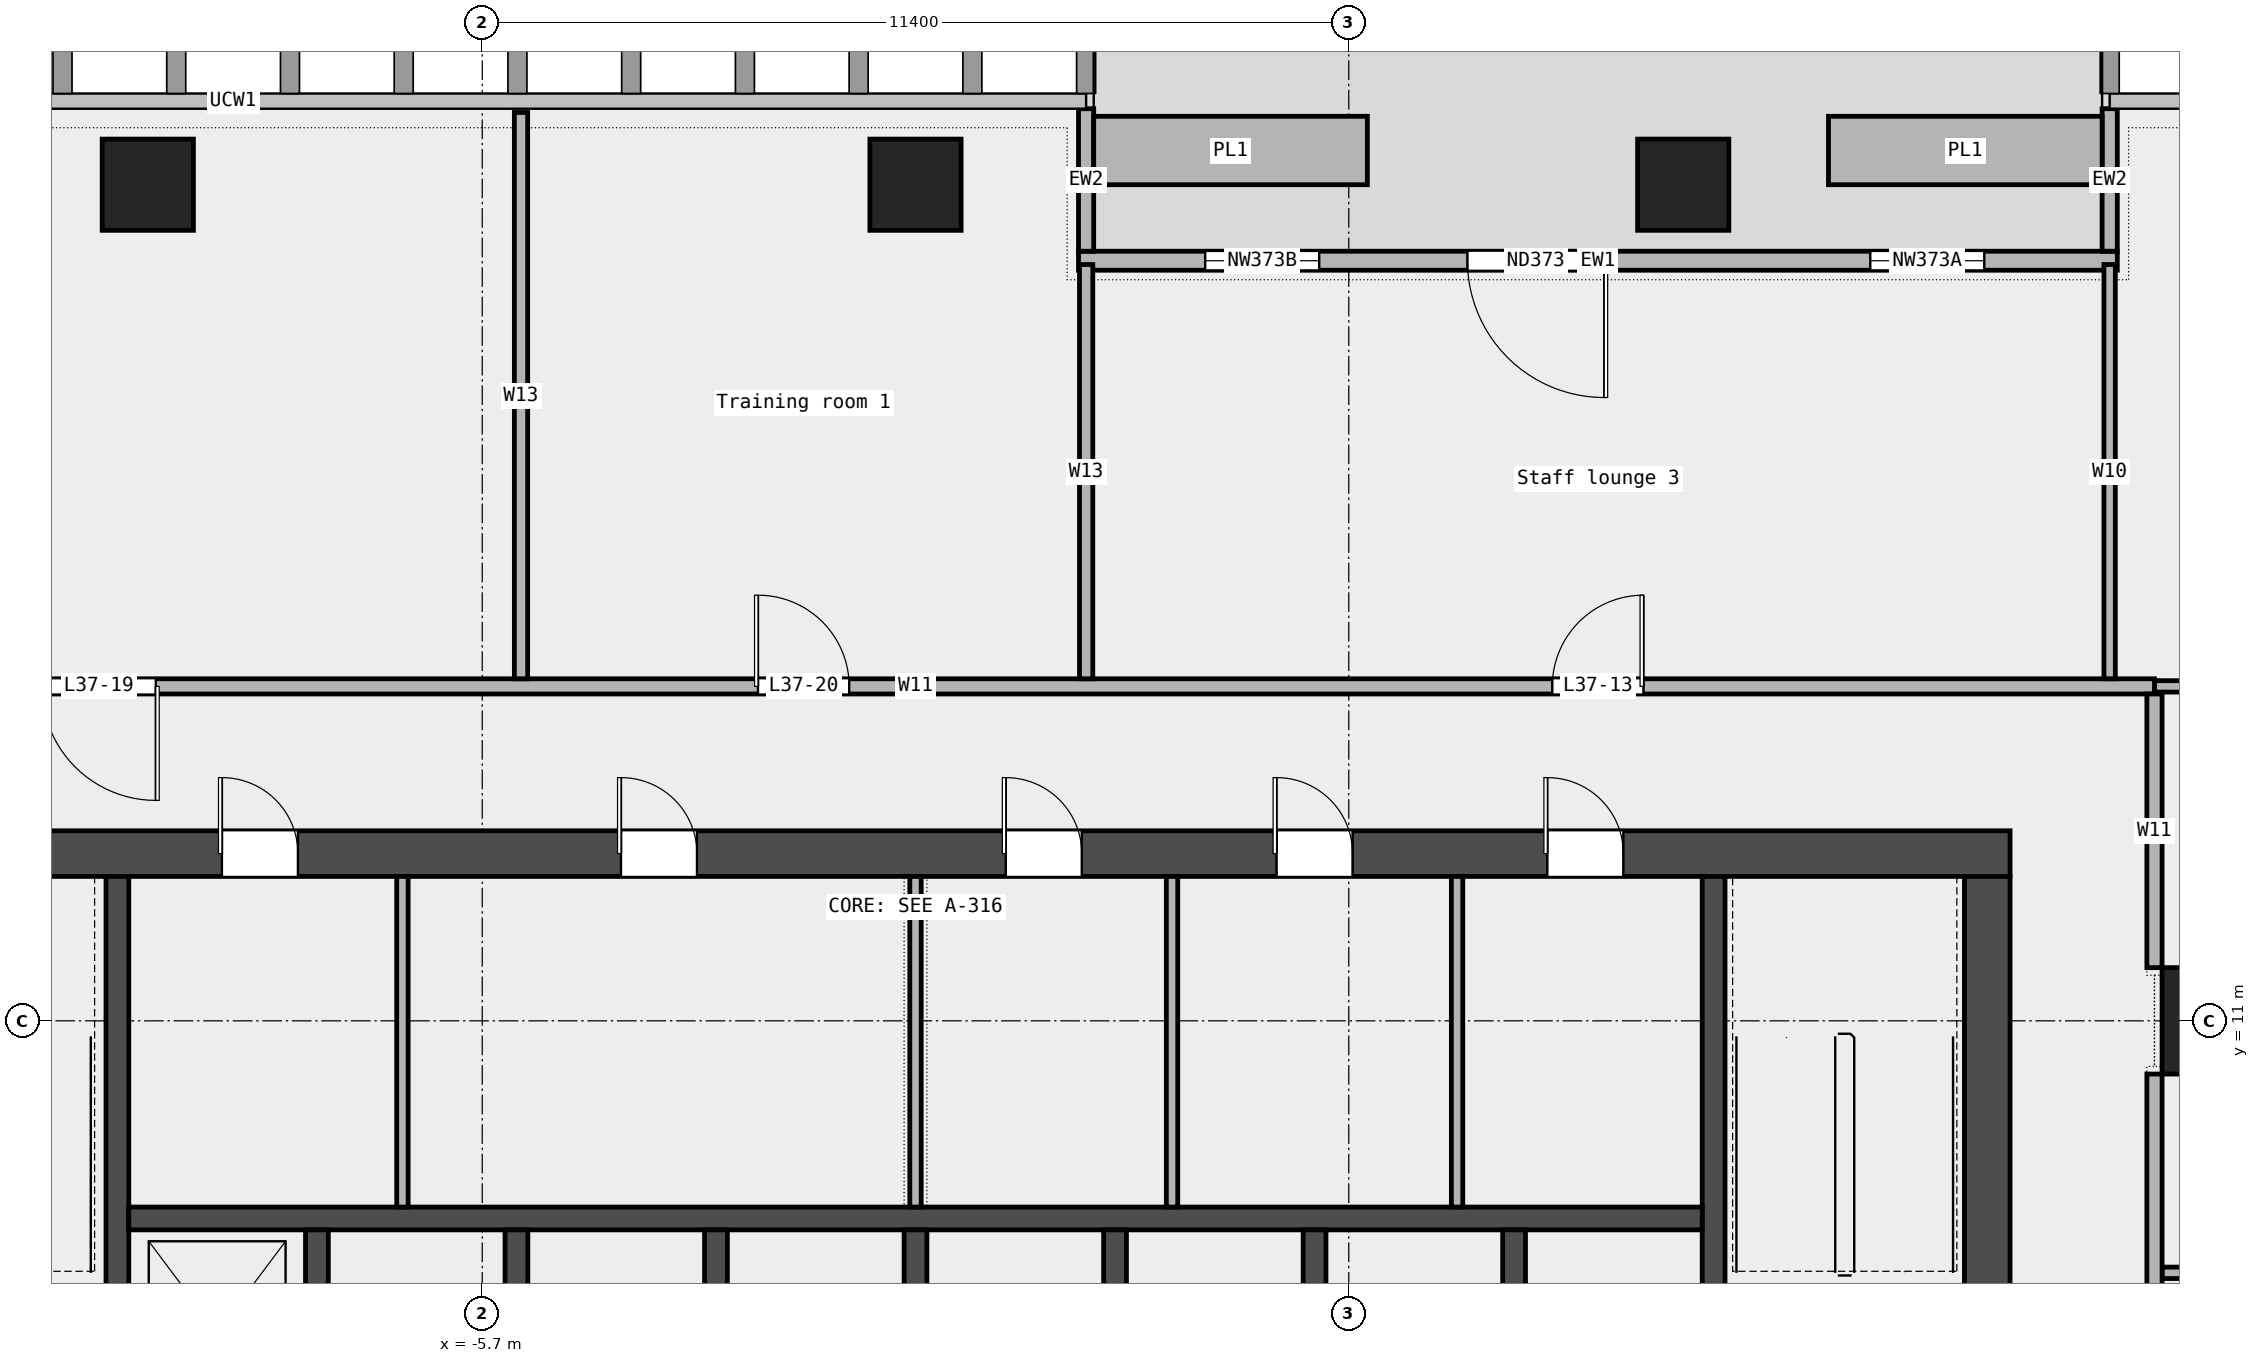
"""IFC4 building model, lengths in metres.
Left out: names, types, materials, properties, quantities, classifications, styles, units other than length and angle.
Written with IfcOpenShell. Run it as: python <this file> out.ifc"""

import sys

from ifc_helpers import new_model, si_unit, direction, frame, frame_2d, origin, origin_2d, place, context, subcontext, project, spatial, rectangle, extrude, element, fill, save


model = new_model("IFC4")
c1 = context("Model", 3, precision=1e-05, world=origin(), true_north=direction((0.0, 1.0)))
c2 = subcontext(c1, "Body", "Model", "MODEL_VIEW")
j1 = project(units=[si_unit("LENGTHUNIT", "METRE"), si_unit("PLANEANGLEUNIT", "RADIAN")], contexts=[c1])
p1 = place(None, origin())
s1 = spatial("IfcSite", under=j1, at=p1, CompositionType="ELEMENT")
p2 = place(p1, origin())
s2 = spatial("IfcBuilding", under=s1, at=p2, CompositionType="ELEMENT")
p3 = place(p2, frame((0.0, 0.0, 181.0)))
s3 = spatial("IfcBuildingStorey", under=s2, at=p3, CompositionType="ELEMENT", Elevation=181.0)
for number, where, z_axis, x_axis in (
    (1, (10.1, 22.0, 0.0), (0.0, 0.0, 1.0), (1.0, 0.0, 0.0)),
    (2, (0.0, 22.0, 0.0), (0.0, 0.0, 1.0), (1.0, 0.0, 0.0)),
    (3, (-10.1, 22.0, 0.0), (0.0, 0.0, 1.0), (1.0, 0.0, 0.0)),
):
    element("IfcColumn", number, at=place(p3, frame(where, z_axis=z_axis, x_axis=x_axis)), inside=s3, PredefinedType="COLUMN", context=c2, shape_type="SweptSolid", body=[
        extrude(rectangle(XDim=1.2, YDim=1.2, at=origin_2d()), origin(), (0.0, 0.0, 1.0), 3.6),
    ])
p4 = place(p3, frame((17.1, 11.0, 0.0), z_axis=(0.0, 0.0, 1.0), x_axis=(1.0, 0.0, 0.0)))
e4 = element("IfcColumn", 4, at=p4, inside=s3, PredefinedType="COLUMN", context=c2, shape_type="SweptSolid", body=[
    extrude(rectangle(XDim=1.4, YDim=1.4, at=origin_2d()), origin(), (0.0, 0.0, 1.0), 3.6),
])
p5 = place(p3, frame((15.811, 21.0, 0.0), z_axis=(0.0, 0.0, 1.0), x_axis=(-1.0, 0.0, 0.0)))
e5 = element("IfcWall", 5, at=p5, inside=s3, PredefinedType="STANDARD", context=c2, shape_type="SweptSolid", body=[
    extrude(rectangle(XDim=13.667, YDim=0.25, at=frame_2d((6.833, 0.0))), origin(), (0.0, 0.0, 1.0), 3.6),
])
p6 = place(p5, frame((1.75, 0.0, 0.45)))
e6 = element("IfcOpeningElement", 6, at=p6, cuts=e5, PredefinedType="OPENING", context=c2, shape_type="SweptSolid", body=[
    extrude(rectangle(XDim=1.5, YDim=2.4, at=frame_2d((0.75, 1.2))), frame((0.0, 0.137, 0.0), z_axis=(0.0, -1.0, 0.0), x_axis=(1.0, 0.0, 0.0)), (0.0, 0.0, 1.0), 0.274),
])
p7 = place(p5, frame((6.75, 0.0, 0.0)))
e7 = element("IfcOpeningElement", 7, at=p7, cuts=e5, PredefinedType="OPENING", context=c2, shape_type="SweptSolid", body=[
    extrude(rectangle(XDim=1.8, YDim=2.4, at=frame_2d((0.9, 1.2))), frame((0.0, 0.137, 0.0), z_axis=(0.0, -1.0, 0.0), x_axis=(1.0, 0.0, 0.0)), (0.0, 0.0, 1.0), 0.274),
])
p8 = place(p5, frame((10.5, 0.0, 0.45)))
e8 = element("IfcOpeningElement", 8, at=p8, cuts=e5, PredefinedType="OPENING", context=c2, shape_type="SweptSolid", body=[
    extrude(rectangle(XDim=1.5, YDim=2.4, at=frame_2d((0.75, 1.2))), frame((0.0, 0.137, 0.0), z_axis=(0.0, -1.0, 0.0), x_axis=(1.0, 0.0, 0.0)), (0.0, 0.0, 1.0), 0.274),
])
for number, where, z_axis, x_axis in (
    (9, (15.711, 23.0, 0.0), (0.0, 0.0, 1.0), (0.0, -1.0, 0.0)),
    (10, (2.244, 23.0, 0.0), (0.0, 0.0, 1.0), (0.0, -1.0, 0.0)),
):
    element("IfcWall", number, at=place(p3, frame(where, z_axis=z_axis, x_axis=x_axis)), inside=s3, PredefinedType="STANDARD", context=c2, shape_type="SweptSolid", body=[
        extrude(rectangle(XDim=1.875, YDim=0.2, at=frame_2d((0.938, 0.0))), origin(), (0.0, 0.0, 1.0), 3.6),
    ])
for number, where, z_axis, x_axis in (
    (11, (15.611, 22.45, 0.0), (0.0, 0.0, 1.0), (-1.0, 0.0, 0.0)),
    (12, (5.944, 22.45, 0.0), (0.0, 0.0, 1.0), (-1.0, 0.0, 0.0)),
):
    element("IfcWall", number, at=place(p3, frame(where, z_axis=z_axis, x_axis=x_axis)), inside=s3, PredefinedType="STANDARD", context=c2, shape_type="SweptSolid", body=[
        extrude(rectangle(XDim=3.6, YDim=0.9, at=frame_2d((1.8, 0.0))), origin(), (0.0, 0.0, 1.0), 0.7),
    ])
p9 = place(p3, frame((16.4, 7.685, 0.0), z_axis=(0.0, 0.0, 1.0), x_axis=(1.0, 0.0, 0.0)))
e13 = element("IfcWall", 13, at=p9, inside=s3, PredefinedType="PARTITIONING", context=c2, shape_type="SweptSolid", body=[
    extrude(rectangle(XDim=3.4, YDim=0.15, at=frame_2d((1.7, 0.0))), origin(), (0.0, 0.0, 1.0), 3.6),
])
p10 = place(p3, frame((16.3, 15.4, 0.0), z_axis=(0.0, 0.0, 1.0), x_axis=(1.0, 0.0, 0.0)))
e14 = element("IfcWall", 14, at=p10, inside=s3, PredefinedType="PARTITIONING", context=c2, shape_type="SweptSolid", body=[
    extrude(rectangle(XDim=3.6, YDim=0.15, at=frame_2d((1.8, 0.0))), origin(), (0.0, 0.0, 1.0), 3.6),
])
p11 = place(p3, frame((-16.3, 15.4, 0.0), z_axis=(0.0, 0.0, 1.0), x_axis=(1.0, 0.0, 0.0)))
e15 = element("IfcWall", 15, at=p11, inside=s3, PredefinedType="PARTITIONING", context=c2, shape_type="SweptSolid", body=[
    extrude(rectangle(XDim=32.6, YDim=0.2, at=frame_2d((16.3, 0.0))), origin(), (0.0, 0.0, 1.0), 3.6),
])
p12 = place(p11, frame((24.677, 0.0, 0.0)))
e16 = element("IfcOpeningElement", 16, at=p12, cuts=e15, PredefinedType="OPENING", context=c2, shape_type="SweptSolid", body=[
    extrude(rectangle(XDim=1.2, YDim=2.1, at=frame_2d((0.6, 1.05))), frame((0.0, 0.112, 0.0), z_axis=(0.0, -1.0, 0.0), x_axis=(1.0, 0.0, 0.0)), (0.0, 0.0, 1.0), 0.224),
])
p13 = place(p11, frame((4.805, 0.0, 0.0)))
e17 = element("IfcOpeningElement", 17, at=p13, cuts=e15, PredefinedType="OPENING", context=c2, shape_type="SweptSolid", body=[
    extrude(rectangle(XDim=1.5, YDim=2.1, at=frame_2d((0.75, 1.05))), frame((0.0, 0.112, 0.0), z_axis=(0.0, -1.0, 0.0), x_axis=(1.0, 0.0, 0.0)), (0.0, 0.0, 1.0), 0.224),
])
p14 = place(p11, frame((14.228, 0.0, 0.0)))
e18 = element("IfcOpeningElement", 18, at=p14, cuts=e15, PredefinedType="OPENING", context=c2, shape_type="SweptSolid", body=[
    extrude(rectangle(XDim=1.2, YDim=2.1, at=frame_2d((0.6, 1.05))), frame((0.0, 0.112, 0.0), z_axis=(0.0, -1.0, 0.0), x_axis=(1.0, 0.0, 0.0)), (0.0, 0.0, 1.0), 0.224),
])
p15 = place(p3, frame((-5.19, 15.5, 0.0), z_axis=(0.0, 0.0, 1.0), x_axis=(0.0, 1.0, 0.0)))
e19 = element("IfcWall", 19, at=p15, inside=s3, PredefinedType="PARTITIONING", context=c2, shape_type="SweptSolid", body=[
    extrude(rectangle(XDim=7.45, YDim=0.175, at=frame_2d((3.725, 0.0))), origin(), (0.0, 0.0, 1.0), 3.6),
])
p16 = place(p3, frame((2.245, 15.5, 0.0), z_axis=(0.0, 0.0, 1.0), x_axis=(0.0, 1.0, 0.0)))
e20 = element("IfcWall", 20, at=p16, inside=s3, PredefinedType="PARTITIONING", context=c2, shape_type="SweptSolid", body=[
    extrude(rectangle(XDim=5.45, YDim=0.175, at=frame_2d((2.725, 0.0))), origin(), (0.0, 0.0, 1.0), 3.6),
])
p17 = place(p3, frame((15.71, 15.5, 0.0), z_axis=(0.0, 0.0, 1.0), x_axis=(0.0, 1.0, 0.0)))
e21 = element("IfcWall", 21, at=p17, inside=s3, PredefinedType="PARTITIONING", context=c2, shape_type="SweptSolid", body=[
    extrude(rectangle(XDim=5.45, YDim=0.15, at=frame_2d((2.725, 0.0))), origin(), (0.0, 0.0, 1.0), 3.6),
])
p18 = place(p3, frame((16.3, 2.95, 0.0), z_axis=(0.0, 0.0, 1.0), x_axis=(0.0, 1.0, 0.0)))
e22 = element("IfcWall", 22, at=p18, inside=s3, PredefinedType="PARTITIONING", context=c2, shape_type="SweptSolid", body=[
    extrude(rectangle(XDim=7.35, YDim=0.2, at=frame_2d((3.675, 0.0))), origin(), (0.0, 0.0, 1.0), 3.6),
])
p19 = place(p3, frame((16.3, 11.7, 0.0), z_axis=(0.0, 0.0, 1.0), x_axis=(0.0, 1.0, 0.0)))
e23 = element("IfcWall", 23, at=p19, inside=s3, PredefinedType="PARTITIONING", context=c2, shape_type="SweptSolid", body=[
    extrude(rectangle(XDim=3.6, YDim=0.2, at=frame_2d((1.8, 0.0))), origin(), (0.0, 0.0, 1.0), 3.6),
])
p20 = place(p3, frame((-14.4, 13.2, 0.0), z_axis=(0.0, 0.0, 1.0), x_axis=(1.0, 0.0, 0.0)))
e24 = element("IfcWall", 24, at=p20, inside=s3, PredefinedType="SHEAR", context=c2, shape_type="SweptSolid", body=[
    extrude(rectangle(XDim=28.8, YDim=0.6, at=frame_2d((14.4, 0.0))), origin(), (0.0, 0.0, 1.0), 3.7),
])
p21 = place(p20, frame((5.275, 0.0, 0.0)))
e25 = element("IfcOpeningElement", 25, at=p21, cuts=e24, PredefinedType="OPENING", context=c2, shape_type="SweptSolid", body=[
    extrude(rectangle(XDim=1.0, YDim=2.1, at=frame_2d((0.5, 1.05))), frame((0.0, 0.312, 0.0), z_axis=(0.0, -1.0, 0.0), x_axis=(1.0, 0.0, 0.0)), (0.0, 0.0, 1.0), 0.624),
])
p22 = place(p20, frame((10.525, 0.0, 0.0)))
e26 = element("IfcOpeningElement", 26, at=p22, cuts=e24, PredefinedType="OPENING", context=c2, shape_type="SweptSolid", body=[
    extrude(rectangle(XDim=1.0, YDim=2.1, at=frame_2d((0.5, 1.05))), frame((0.0, 0.312, 0.0), z_axis=(0.0, -1.0, 0.0), x_axis=(1.0, 0.0, 0.0)), (0.0, 0.0, 1.0), 0.624),
])
p23 = place(p20, frame((15.587, 0.0, 0.0)))
e27 = element("IfcOpeningElement", 27, at=p23, cuts=e24, PredefinedType="OPENING", context=c2, shape_type="SweptSolid", body=[
    extrude(rectangle(XDim=1.0, YDim=2.1, at=frame_2d((0.5, 1.05))), frame((0.0, 0.312, 0.0), z_axis=(0.0, -1.0, 0.0), x_axis=(1.0, 0.0, 0.0)), (0.0, 0.0, 1.0), 0.624),
])
p24 = place(p20, frame((19.15, 0.0, 0.0)))
e28 = element("IfcOpeningElement", 28, at=p24, cuts=e24, PredefinedType="OPENING", context=c2, shape_type="SweptSolid", body=[
    extrude(rectangle(XDim=1.0, YDim=2.1, at=frame_2d((0.5, 1.05))), frame((0.0, 0.312, 0.0), z_axis=(0.0, -1.0, 0.0), x_axis=(1.0, 0.0, 0.0)), (0.0, 0.0, 1.0), 0.624),
])
p25 = place(p20, frame((22.712, 0.0, 0.0)))
e29 = element("IfcOpeningElement", 29, at=p25, cuts=e24, PredefinedType="OPENING", context=c2, shape_type="SweptSolid", body=[
    extrude(rectangle(XDim=1.0, YDim=2.1, at=frame_2d((0.5, 1.05))), frame((0.0, 0.312, 0.0), z_axis=(0.0, -1.0, 0.0), x_axis=(1.0, 0.0, 0.0)), (0.0, 0.0, 1.0), 0.624),
])
p26 = place(p3, frame((14.1, -6.6, 0.0), z_axis=(0.0, 0.0, 1.0), x_axis=(0.0, 1.0, 0.0)))
e30 = element("IfcWall", 30, at=p26, inside=s3, PredefinedType="SHEAR", context=c2, shape_type="SweptSolid", body=[
    extrude(rectangle(XDim=19.5, YDim=0.6, at=frame_2d((9.75, 0.0))), origin(), (0.0, 0.0, 1.0), 3.7),
])
p27 = place(p26, frame((9.3, 0.0, 0.0)))
e31 = element("IfcOpeningElement", 31, at=p27, cuts=e30, PredefinedType="OPENING", context=c2, shape_type="SweptSolid", body=[
    extrude(rectangle(XDim=1.8, YDim=2.1, at=frame_2d((0.9, 1.05))), frame((0.0, 0.312, 0.0), z_axis=(0.0, -1.0, 0.0), x_axis=(1.0, 0.0, 0.0)), (0.0, 0.0, 1.0), 0.624),
])
for number, where, z_axis, x_axis in (
    (32, (-10.5, 5.25, 0.0), (0.0, 0.0, 1.0), (0.0, 1.0, 0.0)),
    (33, (10.5, 5.25, 0.0), (0.0, 0.0, 1.0), (0.0, 1.0, 0.0)),
):
    element("IfcWall", number, at=place(p3, frame(where, z_axis=z_axis, x_axis=x_axis)), inside=s3, PredefinedType="SHEAR", context=c2, shape_type="SweptSolid", body=[
        extrude(rectangle(XDim=7.65, YDim=0.3, at=frame_2d((3.825, 0.0))), origin(), (0.0, 0.0, 1.0), 3.7),
    ])
p28 = place(p3, frame((-10.35, 8.4, 0.0), z_axis=(0.0, 0.0, 1.0), x_axis=(1.0, 0.0, 0.0)))
e34 = element("IfcWall", 34, at=p28, inside=s3, PredefinedType="SOLIDWALL", context=c2, shape_type="SweptSolid", body=[
    extrude(rectangle(XDim=20.7, YDim=0.3, at=frame_2d((10.35, 0.0))), origin(), (0.0, 0.0, 1.0), 3.7),
])
for number, where, z_axis, x_axis in (
    (35, (-7.875, 5.55, 0.0), (0.0, 0.0, 1.0), (0.0, 1.0, 0.0)),
    (36, (-5.25, 5.55, 0.0), (0.0, 0.0, 1.0), (0.0, 1.0, 0.0)),
    (37, (-2.625, 5.55, 0.0), (0.0, 0.0, 1.0), (0.0, 1.0, 0.0)),
    (38, (0.0, 5.55, 0.0), (0.0, 0.0, 1.0), (0.0, 1.0, 0.0)),
    (39, (2.625, 5.55, 0.0), (0.0, 0.0, 1.0), (0.0, 1.0, 0.0)),
    (40, (5.25, 5.55, 0.0), (0.0, 0.0, 1.0), (0.0, 1.0, 0.0)),
    (41, (7.875, 5.55, 0.0), (0.0, 0.0, 1.0), (0.0, 1.0, 0.0)),
):
    element("IfcWall", number, at=place(p3, frame(where, z_axis=z_axis, x_axis=x_axis)), inside=s3, PredefinedType="SOLIDWALL", context=c2, shape_type="SweptSolid", body=[
        extrude(rectangle(XDim=2.7, YDim=0.3, at=frame_2d((1.35, 0.0))), origin(), (0.0, 0.0, 1.0), 3.7),
    ])
for number, where, z_axis, x_axis in (
    (42, (-6.75, 8.55, 0.0), (0.0, 0.0, 1.0), (0.0, 1.0, 0.0)),
    (43, (0.0, 8.55, 0.0), (0.0, 0.0, 1.0), (0.0, 1.0, 0.0)),
    (44, (3.375, 8.55, 0.0), (0.0, 0.0, 1.0), (0.0, 1.0, 0.0)),
    (45, (7.125, 8.55, 0.0), (0.0, 0.0, 1.0), (0.0, 1.0, 0.0)),
):
    element("IfcWall", number, at=place(p3, frame(where, z_axis=z_axis, x_axis=x_axis)), inside=s3, PredefinedType="PARTITIONING", context=c2, shape_type="SweptSolid", body=[
        extrude(rectangle(XDim=4.35, YDim=0.15, at=frame_2d((2.175, 0.0))), origin(), (0.0, 0.0, 1.0), 3.7),
    ])
p29 = place(p6, origin())
e46 = element("IfcWindow", 46, at=p29, inside=s3, PartitioningType="SINGLE_PANEL", PredefinedType="WINDOW", context=c2, shape_type="SweptSolid", body=[
    extrude(rectangle(XDim=1.5, YDim=2.4, at=frame_2d((0.75, 1.2))), frame((0.0, 0.03, 0.0), z_axis=(0.0, -1.0, 0.0), x_axis=(1.0, 0.0, 0.0)), (0.0, 0.0, 1.0), 0.06),
])
fill(e6, e46)
p30 = place(p7, origin())
e47 = element("IfcDoor", 47, at=p30, inside=s3, OperationType="DOUBLE_DOOR_SINGLE_SWING", PredefinedType="DOOR", context=c2, shape_type="SweptSolid", body=[
    extrude(rectangle(XDim=1.8, YDim=2.4, at=frame_2d((0.9, 1.2))), frame((0.0, 0.025, 0.0), z_axis=(0.0, -1.0, 0.0), x_axis=(1.0, 0.0, 0.0)), (0.0, 0.0, 1.0), 0.05),
])
fill(e7, e47)
p31 = place(p8, origin())
e48 = element("IfcWindow", 48, at=p31, inside=s3, PartitioningType="SINGLE_PANEL", PredefinedType="WINDOW", context=c2, shape_type="SweptSolid", body=[
    extrude(rectangle(XDim=1.5, YDim=2.4, at=frame_2d((0.75, 1.2))), frame((0.0, 0.03, 0.0), z_axis=(0.0, -1.0, 0.0), x_axis=(1.0, 0.0, 0.0)), (0.0, 0.0, 1.0), 0.06),
])
fill(e8, e48)
p32 = place(p12, origin())
e49 = element("IfcDoor", 49, at=p32, inside=s3, OperationType="SINGLE_SWING_RIGHT", PredefinedType="DOOR", context=c2, shape_type="SweptSolid", body=[
    extrude(rectangle(XDim=1.2, YDim=2.1, at=frame_2d((0.6, 1.05))), frame((0.0, 0.025, 0.0), z_axis=(0.0, -1.0, 0.0), x_axis=(1.0, 0.0, 0.0)), (0.0, 0.0, 1.0), 0.05),
])
fill(e16, e49)
p33 = place(p13, origin())
e50 = element("IfcDoor", 50, at=p33, inside=s3, OperationType="DOUBLE_DOOR_SINGLE_SWING", PredefinedType="DOOR", context=c2, shape_type="SweptSolid", body=[
    extrude(rectangle(XDim=1.5, YDim=2.1, at=frame_2d((0.75, 1.05))), frame((0.0, 0.025, 0.0), z_axis=(0.0, -1.0, 0.0), x_axis=(1.0, 0.0, 0.0)), (0.0, 0.0, 1.0), 0.05),
])
fill(e17, e50)
p34 = place(p14, origin())
e51 = element("IfcDoor", 51, at=p34, inside=s3, OperationType="SINGLE_SWING_LEFT", PredefinedType="DOOR", context=c2, shape_type="SweptSolid", body=[
    extrude(rectangle(XDim=1.2, YDim=2.1, at=frame_2d((0.6, 1.05))), frame((0.0, 0.025, 0.0), z_axis=(0.0, -1.0, 0.0), x_axis=(1.0, 0.0, 0.0)), (0.0, 0.0, 1.0), 0.05),
])
fill(e18, e51)
p35 = place(p21, origin())
e52 = element("IfcDoor", 52, at=p35, inside=s3, OperationType="SINGLE_SWING_LEFT", PredefinedType="DOOR", context=c2, shape_type="SweptSolid", body=[
    extrude(rectangle(XDim=1.0, YDim=2.1, at=frame_2d((0.5, 1.05))), frame((0.0, 0.025, 0.0), z_axis=(0.0, -1.0, 0.0), x_axis=(1.0, 0.0, 0.0)), (0.0, 0.0, 1.0), 0.05),
])
fill(e25, e52)
p36 = place(p22, origin())
e53 = element("IfcDoor", 53, at=p36, inside=s3, OperationType="SINGLE_SWING_LEFT", PredefinedType="DOOR", context=c2, shape_type="SweptSolid", body=[
    extrude(rectangle(XDim=1.0, YDim=2.1, at=frame_2d((0.5, 1.05))), frame((0.0, 0.025, 0.0), z_axis=(0.0, -1.0, 0.0), x_axis=(1.0, 0.0, 0.0)), (0.0, 0.0, 1.0), 0.05),
])
fill(e26, e53)
p37 = place(p23, origin())
e54 = element("IfcDoor", 54, at=p37, inside=s3, OperationType="SINGLE_SWING_LEFT", PredefinedType="DOOR", context=c2, shape_type="SweptSolid", body=[
    extrude(rectangle(XDim=1.0, YDim=2.1, at=frame_2d((0.5, 1.05))), frame((0.0, 0.025, 0.0), z_axis=(0.0, -1.0, 0.0), x_axis=(1.0, 0.0, 0.0)), (0.0, 0.0, 1.0), 0.05),
])
fill(e27, e54)
p38 = place(p24, origin())
e55 = element("IfcDoor", 55, at=p38, inside=s3, OperationType="SINGLE_SWING_LEFT", PredefinedType="DOOR", context=c2, shape_type="SweptSolid", body=[
    extrude(rectangle(XDim=1.0, YDim=2.1, at=frame_2d((0.5, 1.05))), frame((0.0, 0.025, 0.0), z_axis=(0.0, -1.0, 0.0), x_axis=(1.0, 0.0, 0.0)), (0.0, 0.0, 1.0), 0.05),
])
fill(e28, e55)
p39 = place(p25, origin())
e56 = element("IfcDoor", 56, at=p39, inside=s3, OperationType="SINGLE_SWING_LEFT", PredefinedType="DOOR", context=c2, shape_type="SweptSolid", body=[
    extrude(rectangle(XDim=1.0, YDim=2.1, at=frame_2d((0.5, 1.05))), frame((0.0, 0.025, 0.0), z_axis=(0.0, -1.0, 0.0), x_axis=(1.0, 0.0, 0.0)), (0.0, 0.0, 1.0), 0.05),
])
fill(e29, e56)
save(model, sys.argv[1])
